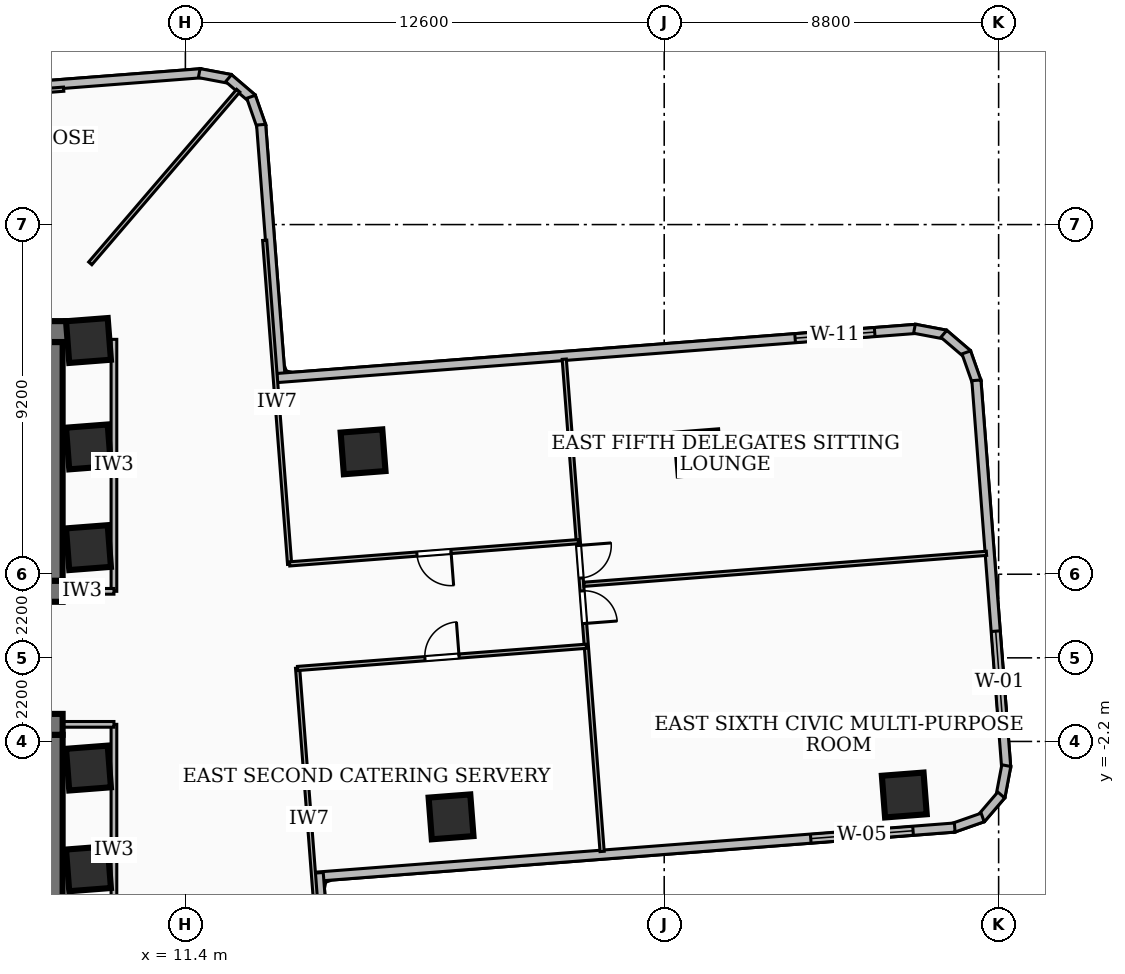
"""IFC4 building model, lengths in metres.
Left out: names, types, materials, properties, quantities, classifications, styles, units other than length and angle.
Written with IfcOpenShell. Run it as: python <this file> out.ifc"""

import sys

from ifc_helpers import new_model, si_unit, direction, frame, frame_2d, origin, origin_2d, place, context, subcontext, project, spatial, rectangle, extrude, element, fill, save


model = new_model("IFC4")
c1 = context("Model", 3, precision=1e-05, world=origin(), true_north=direction((0.0, 1.0)))
c2 = subcontext(c1, "Body", "Model", "MODEL_VIEW")
j1 = project(units=[si_unit("LENGTHUNIT", "METRE"), si_unit("PLANEANGLEUNIT", "RADIAN")], contexts=[c1])
p1 = place(None, origin())
s1 = spatial("IfcSite", under=j1, at=p1, CompositionType="ELEMENT")
p2 = place(p1, origin())
s2 = spatial("IfcBuilding", under=s1, at=p2, CompositionType="ELEMENT")
p3 = place(p2, frame((0.0, 0.0, 60.48)))
s3 = spatial("IfcBuildingStorey", under=s2, at=p3, CompositionType="ELEMENT", Elevation=60.48)
p4 = place(p3, frame((-8.78, 8.585, 0.0), z_axis=(0.0, 0.0, 1.0), x_axis=(1.0, 0.0, 0.0)))
e1 = element("IfcWall", 1, at=p4, inside=s3, PredefinedType="SHEAR", context=c2, shape_type="SweptSolid", body=[
    extrude(rectangle(XDim=17.56, YDim=0.55, at=frame_2d((8.78, 0.0))), origin(), (0.0, 0.0, 1.0), 3.32),
])
p5 = place(p3, frame((8.17, 1.75, 0.0), z_axis=(0.0, 0.0, 1.0), x_axis=(-1.0, 0.0, 0.0)))
e2 = element("IfcWall", 2, at=p5, inside=s3, PredefinedType="SHEAR", context=c2, shape_type="SweptSolid", body=[
    extrude(rectangle(XDim=16.34, YDim=0.55, at=frame_2d((8.17, 0.0))), origin(), (0.0, 0.0, 1.0), 3.32),
])
p6 = place(p5, frame((7.45, 0.0, 0.0)))
e3 = element("IfcOpeningElement", 3, at=p6, cuts=e2, PredefinedType="OPENING", context=c2, shape_type="SweptSolid", body=[
    extrude(rectangle(XDim=1.0, YDim=2.1, at=frame_2d((0.5, 1.05))), frame((0.0, 0.285, 0.0), z_axis=(0.0, -1.0, 0.0), x_axis=(1.0, 0.0, 0.0)), (0.0, 0.0, 1.0), 0.57),
])
p7 = place(p5, frame((3.4, 0.0, 0.0)))
e4 = element("IfcOpeningElement", 4, at=p7, cuts=e2, PredefinedType="OPENING", context=c2, shape_type="SweptSolid", body=[
    extrude(rectangle(XDim=0.9, YDim=2.06, at=frame_2d((0.45, 1.03))), frame((0.0, 0.285, 0.0), z_axis=(0.0, -1.0, 0.0), x_axis=(1.0, 0.0, 0.0)), (0.0, 0.0, 1.0), 0.57),
])
p8 = place(p5, frame((1.1, 0.0, 0.0)))
e5 = element("IfcOpeningElement", 5, at=p8, cuts=e2, PredefinedType="OPENING", context=c2, shape_type="SweptSolid", body=[
    extrude(rectangle(XDim=0.9, YDim=2.06, at=frame_2d((0.45, 1.03))), frame((0.0, 0.285, 0.0), z_axis=(0.0, -1.0, 0.0), x_axis=(1.0, 0.0, 0.0)), (0.0, 0.0, 1.0), 0.57),
])
p9 = place(p3, frame((7.895, 8.31, 0.0), z_axis=(0.0, 0.0, 1.0), x_axis=(0.0, -1.0, 0.0)))
e6 = element("IfcWall", 6, at=p9, inside=s3, PredefinedType="SHEAR", context=c2, shape_type="SweptSolid", body=[
    extrude(rectangle(XDim=6.285, YDim=0.55, at=frame_2d((3.143, 0.0))), origin(), (0.0, 0.0, 1.0), 3.32),
])
p10 = place(p3, frame((-8.17, -1.75, 0.0), z_axis=(0.0, 0.0, 1.0), x_axis=(1.0, 0.0, 0.0)))
e7 = element("IfcWall", 7, at=p10, inside=s3, PredefinedType="SHEAR", context=c2, shape_type="SweptSolid", body=[
    extrude(rectangle(XDim=16.34, YDim=0.55, at=frame_2d((8.17, 0.0))), origin(), (0.0, 0.0, 1.0), 3.32),
])
p11 = place(p10, frame((7.45, 0.0, 0.0)))
e8 = element("IfcOpeningElement", 8, at=p11, cuts=e7, PredefinedType="OPENING", context=c2, shape_type="SweptSolid", body=[
    extrude(rectangle(XDim=1.0, YDim=2.1, at=frame_2d((0.5, 1.05))), frame((0.0, 0.285, 0.0), z_axis=(0.0, -1.0, 0.0), x_axis=(1.0, 0.0, 0.0)), (0.0, 0.0, 1.0), 0.57),
])
p12 = place(p10, frame((10.965, 0.0, 0.0)))
e9 = element("IfcOpeningElement", 9, at=p12, cuts=e7, PredefinedType="OPENING", context=c2, shape_type="SweptSolid", body=[
    extrude(rectangle(XDim=1.05, YDim=2.15, at=frame_2d((0.525, 1.075))), frame((0.0, 0.285, 0.0), z_axis=(0.0, -1.0, 0.0), x_axis=(1.0, 0.0, 0.0)), (0.0, 0.0, 1.0), 0.57),
])
p13 = place(p10, frame((12.525, 0.0, 0.0)))
e10 = element("IfcOpeningElement", 10, at=p13, cuts=e7, PredefinedType="OPENING", context=c2, shape_type="SweptSolid", body=[
    extrude(rectangle(XDim=1.05, YDim=2.15, at=frame_2d((0.525, 1.075))), frame((0.0, 0.285, 0.0), z_axis=(0.0, -1.0, 0.0), x_axis=(1.0, 0.0, 0.0)), (0.0, 0.0, 1.0), 0.57),
])
p14 = place(p10, frame((14.085, 0.0, 0.0)))
e11 = element("IfcOpeningElement", 11, at=p14, cuts=e7, PredefinedType="OPENING", context=c2, shape_type="SweptSolid", body=[
    extrude(rectangle(XDim=1.05, YDim=2.15, at=frame_2d((0.525, 1.075))), frame((0.0, 0.285, 0.0), z_axis=(0.0, -1.0, 0.0), x_axis=(1.0, 0.0, 0.0)), (0.0, 0.0, 1.0), 0.57),
])
p15 = place(p3, frame((7.895, -2.025, 0.0), z_axis=(0.0, 0.0, 1.0), x_axis=(0.0, -1.0, 0.0)))
e12 = element("IfcWall", 12, at=p15, inside=s3, PredefinedType="SHEAR", context=c2, shape_type="SweptSolid", body=[
    extrude(rectangle(XDim=6.285, YDim=0.55, at=frame_2d((3.143, 0.0))), origin(), (0.0, 0.0, 1.0), 3.32),
])
for number, where, z_axis, x_axis in (
    (13, (8.85, -5.55, 0.0), (0.0, 0.0, 1.0), (0.997, 0.077, 0.0)),
    (14, (8.85, -2.9, 0.0), (0.0, 0.0, 1.0), (0.997, 0.077, 0.0)),
    (15, (8.85, 2.9, 0.0), (0.0, 0.0, 1.0), (0.997, 0.077, 0.0)),
    (16, (8.85, 5.55, 0.0), (0.0, 0.0, 1.0), (0.997, 0.077, 0.0)),
    (17, (8.85, 8.35, 0.0), (0.0, 0.0, 1.0), (0.997, 0.077, 0.0)),
    (18, (18.391, -4.184, 0.0), (0.0, 0.0, 1.0), (0.997, 0.077, 0.0)),
    (19, (16.076, 5.421, 0.0), (0.0, 0.0, 1.0), (0.997, 0.077, 0.0)),
    (20, (30.318, -3.609, 0.0), (0.0, 0.0, 1.0), (0.997, 0.077, 0.0)),
    (21, (24.888, 5.393, 0.0), (0.0, 0.0, 1.0), (0.997, 0.077, 0.0)),
):
    element("IfcColumn", number, at=place(p3, frame(where, z_axis=z_axis, x_axis=x_axis)), inside=s3, PredefinedType="COLUMN", context=c2, shape_type="SweptSolid", body=[
        extrude(rectangle(XDim=1.1, YDim=1.1, at=origin_2d()), origin(), (0.0, 0.0, 1.0), 3.6),
    ])
p16 = place(p3, frame((5.657, 14.908, 0.0), z_axis=(0.0, 0.0, 1.0), x_axis=(0.997048202977, 0.076778128006, 0.0)))
e22 = element("IfcWall", 22, at=p16, inside=s3, PredefinedType="SOLIDWALL", context=c2, shape_type="SweptSolid", body=[
    extrude(rectangle(XDim=6.175, YDim=0.24, at=frame_2d((3.088, 0.0))), origin(), (0.0, 0.0, 1.0), 2.401),
])
p17 = place(p3, frame((11.764, 15.385, 0.0), z_axis=(0.0, 0.0, 1.0), x_axis=(0.982688894005, -0.185263427582, 0.0)))
e23 = element("IfcWall", 23, at=p17, inside=s3, PredefinedType="SOLIDWALL", context=c2, shape_type="SweptSolid", body=[
    extrude(rectangle(XDim=0.832, YDim=0.24, at=frame_2d((0.416, 0.0))), origin(), (0.0, 0.0, 1.0), 3.32),
])
p18 = place(p3, frame((12.537, 15.252, 0.0), z_axis=(0.0, 0.0, 1.0), x_axis=(0.759616636226, -0.650371098657, 0.0)))
e24 = element("IfcWall", 24, at=p18, inside=s3, PredefinedType="SOLIDWALL", context=c2, shape_type="SweptSolid", body=[
    extrude(rectangle(XDim=0.813, YDim=0.24, at=frame_2d((0.407, 0.0))), origin(), (0.0, 0.0, 1.0), 3.32),
])
p19 = place(p3, frame((13.128, 14.763, 0.0), z_axis=(0.0, 0.0, 1.0), x_axis=(0.331174926, -0.943569376564, 0.0)))
e25 = element("IfcWall", 25, at=p19, inside=s3, PredefinedType="SOLIDWALL", context=c2, shape_type="SweptSolid", body=[
    extrude(rectangle(XDim=0.831, YDim=0.24, at=frame_2d((0.416, 0.0))), origin(), (0.0, 0.0, 1.0), 3.32),
])
p20 = place(p3, frame((13.393, 14.028, 0.0), z_axis=(0.0, 0.0, 1.0), x_axis=(0.076754366588, -0.997050032451, 0.0)))
e26 = element("IfcWall", 26, at=p20, inside=s3, PredefinedType="SOLIDWALL", context=c2, shape_type="SweptSolid", body=[
    extrude(rectangle(XDim=6.775, YDim=0.24, at=frame_2d((3.388, 0.0))), origin(), (0.0, 0.0, 1.0), 3.32),
])
p21 = place(p3, frame((13.81, 7.362, 0.0), z_axis=(0.0, 0.0, 1.0), x_axis=(0.997055761943, 0.076679903335, 0.0)))
e27 = element("IfcWall", 27, at=p21, inside=s3, PredefinedType="SOLIDWALL", context=c2, shape_type="SweptSolid", body=[
    extrude(rectangle(XDim=16.875, YDim=0.24, at=frame_2d((8.438, 0.0))), origin(), (0.0, 0.0, 1.0), 3.32),
])
p22 = place(p21, frame((13.675, 0.0, 0.85)))
e28 = element("IfcOpeningElement", 28, at=p22, cuts=e27, PredefinedType="OPENING", context=c2, shape_type="SweptSolid", body=[
    extrude(rectangle(XDim=2.1, YDim=1.6, at=frame_2d((1.05, 0.8))), frame((0.0, 0.13, 0.0), z_axis=(0.0, -1.0, 0.0), x_axis=(1.0, 0.0, 0.0)), (0.0, 0.0, 1.0), 0.26),
])
p23 = place(p3, frame((30.585, 8.659, 0.0), z_axis=(0.0, 0.0, 1.0), x_axis=(0.982688894005, -0.185263427582, 0.0)))
e29 = element("IfcWall", 29, at=p23, inside=s3, PredefinedType="SOLIDWALL", context=c2, shape_type="SweptSolid", body=[
    extrude(rectangle(XDim=0.832, YDim=0.24, at=frame_2d((0.416, 0.0))), origin(), (0.0, 0.0, 1.0), 3.32),
])
p24 = place(p3, frame((31.358, 8.526, 0.0), z_axis=(0.0, 0.0, 1.0), x_axis=(0.759891778471, -0.650049601962, 0.0)))
e30 = element("IfcWall", 30, at=p24, inside=s3, PredefinedType="SOLIDWALL", context=c2, shape_type="SweptSolid", body=[
    extrude(rectangle(XDim=0.813, YDim=0.24, at=frame_2d((0.407, 0.0))), origin(), (0.0, 0.0, 1.0), 3.32),
])
p25 = place(p3, frame((31.949, 8.037, 0.0), z_axis=(0.0, 0.0, 1.0), x_axis=(0.332128799234, -0.943234043448, 0.0)))
e31 = element("IfcWall", 31, at=p25, inside=s3, PredefinedType="SOLIDWALL", context=c2, shape_type="SweptSolid", body=[
    extrude(rectangle(XDim=0.831, YDim=0.24, at=frame_2d((0.416, 0.0))), origin(), (0.0, 0.0, 1.0), 3.32),
])
p26 = place(p3, frame((32.215, 7.302, 0.0), z_axis=(0.0, 0.0, 1.0), x_axis=(0.076720251263, -0.997052658111, 0.0)))
e32 = element("IfcWall", 32, at=p26, inside=s3, PredefinedType="SOLIDWALL", context=c2, shape_type="SweptSolid", body=[
    extrude(rectangle(XDim=10.218, YDim=0.24, at=frame_2d((5.109, 0.0))), origin(), (0.0, 0.0, 1.0), 3.32),
])
p27 = place(p26, frame((6.62, 0.0, 0.85)))
e33 = element("IfcOpeningElement", 33, at=p27, cuts=e32, PredefinedType="OPENING", context=c2, shape_type="SweptSolid", body=[
    extrude(rectangle(XDim=2.7, YDim=2.1, at=frame_2d((1.35, 1.05))), frame((0.0, 0.13, 0.0), z_axis=(0.0, -1.0, 0.0), x_axis=(1.0, 0.0, 0.0)), (0.0, 0.0, 1.0), 0.26),
])
p28 = place(p3, frame((33.002, -2.836, 0.0), z_axis=(0.0, 0.0, 1.0), x_axis=(-0.185263427582, -0.982688894005, 0.0)))
e34 = element("IfcWall", 34, at=p28, inside=s3, PredefinedType="SOLIDWALL", context=c2, shape_type="SweptSolid", body=[
    extrude(rectangle(XDim=0.832, YDim=0.24, at=frame_2d((0.416, 0.0))), origin(), (0.0, 0.0, 1.0), 3.32),
])
p29 = place(p3, frame((32.869, -3.609, 0.0), z_axis=(0.0, 0.0, 1.0), x_axis=(-0.650049601962, -0.759891778471, 0.0)))
e35 = element("IfcWall", 35, at=p29, inside=s3, PredefinedType="SOLIDWALL", context=c2, shape_type="SweptSolid", body=[
    extrude(rectangle(XDim=0.813, YDim=0.24, at=frame_2d((0.407, 0.0))), origin(), (0.0, 0.0, 1.0), 3.32),
])
p30 = place(p3, frame((32.38, -4.2, 0.0), z_axis=(0.0, 0.0, 1.0), x_axis=(-0.943569376564, -0.331174926, 0.0)))
e36 = element("IfcWall", 36, at=p30, inside=s3, PredefinedType="SOLIDWALL", context=c2, shape_type="SweptSolid", body=[
    extrude(rectangle(XDim=0.831, YDim=0.24, at=frame_2d((0.416, 0.0))), origin(), (0.0, 0.0, 1.0), 3.32),
])
p31 = place(p3, frame((31.645, -4.465, 0.0), z_axis=(0.0, 0.0, 1.0), x_axis=(-0.997051676532, -0.076733006752, 0.0)))
e37 = element("IfcWall", 37, at=p31, inside=s3, PredefinedType="SOLIDWALL", context=c2, shape_type="SweptSolid", body=[
    extrude(rectangle(XDim=16.876, YDim=0.24, at=frame_2d((8.438, 0.0))), origin(), (0.0, 0.0, 1.0), 3.32),
])
p32 = place(p31, frame((1.1, 0.0, 0.85)))
e38 = element("IfcOpeningElement", 38, at=p32, cuts=e37, PredefinedType="OPENING", context=c2, shape_type="SweptSolid", body=[
    extrude(rectangle(XDim=2.7, YDim=1.85, at=frame_2d((1.35, 0.925))), frame((0.0, 0.13, 0.0), z_axis=(0.0, -1.0, 0.0), x_axis=(1.0, 0.0, 0.0)), (0.0, 0.0, 1.0), 0.26),
])
p33 = place(p3, frame((14.908, -5.657, 0.0), z_axis=(0.0, 0.0, 1.0), x_axis=(0.076778128006, -0.997048202977, 0.0)))
e39 = element("IfcWall", 39, at=p33, inside=s3, PredefinedType="SOLIDWALL", context=c2, shape_type="SweptSolid", body=[
    extrude(rectangle(XDim=6.175, YDim=0.24, at=frame_2d((3.088, 0.0))), origin(), (0.0, 0.0, 1.0), 3.32),
])
p34 = place(p3, frame((9.52, 1.75, 0.0), z_axis=(0.0, 0.0, 1.0), x_axis=(0.0, 1.0, 0.0)))
e40 = element("IfcWall", 40, at=p34, inside=s3, PredefinedType="PARTITIONING", context=c2, shape_type="SweptSolid", body=[
    extrude(rectangle(XDim=6.63, YDim=0.15, at=frame_2d((3.315, 0.0))), origin(), (0.0, 0.0, 1.0), 2.401),
])
p35 = place(p3, frame((7.85, 1.75, 0.0), z_axis=(0.0, 0.0, 1.0), x_axis=(1.0, 0.0, 0.0)))
e41 = element("IfcWall", 41, at=p35, inside=s3, PredefinedType="PARTITIONING", context=c2, shape_type="SweptSolid", body=[
    extrude(rectangle(XDim=1.67, YDim=0.15, at=frame_2d((0.835, 0.0))), origin(), (0.0, 0.0, 1.0), 2.385),
])
p36 = place(p3, frame((9.52, -8.38, 0.0), z_axis=(0.0, 0.0, 1.0), x_axis=(0.0, 1.0, 0.0)))
e42 = element("IfcWall", 42, at=p36, inside=s3, PredefinedType="PARTITIONING", context=c2, shape_type="SweptSolid", body=[
    extrude(rectangle(XDim=6.63, YDim=0.15, at=frame_2d((3.315, 0.0))), origin(), (0.0, 0.0, 1.0), 2.401),
])
p37 = place(p3, frame((7.85, -1.75, 0.0), z_axis=(0.0, 0.0, 1.0), x_axis=(1.0, 0.0, 0.0)))
e43 = element("IfcWall", 43, at=p37, inside=s3, PredefinedType="PARTITIONING", context=c2, shape_type="SweptSolid", body=[
    extrude(rectangle(XDim=1.67, YDim=0.15, at=frame_2d((0.835, 0.0))), origin(), (0.0, 0.0, 1.0), 2.385),
])
p38 = place(p3, frame((8.897, 10.38, 0.0), z_axis=(0.0, 0.0, 1.0), x_axis=(0.650777932984, 0.759268122564, 0.0)))
e44 = element("IfcWall", 44, at=p38, inside=s3, PredefinedType="PARTITIONING", context=c2, shape_type="SweptSolid", body=[
    extrude(rectangle(XDim=5.984, YDim=0.11, at=frame_2d((2.992, 0.0))), origin(), (0.0, 0.0, 1.0), 3.32),
])
p39 = place(p3, frame((14.143, 2.462, 0.0), z_axis=(0.0, 0.0, 1.0), x_axis=(-0.076722700704, 0.997052469631, 0.0)))
e45 = element("IfcWall", 45, at=p39, inside=s3, PredefinedType="PARTITIONING", context=c2, shape_type="SweptSolid", body=[
    extrude(rectangle(XDim=8.55, YDim=0.11, at=frame_2d((4.275, 0.0))), origin(), (0.0, 0.0, 1.0), 2.401),
])
p40 = place(p3, frame((14.963, -8.197, 0.0), z_axis=(0.0, 0.0, 1.0), x_axis=(-0.076708240121, 0.99705358226, 0.0)))
e46 = element("IfcWall", 46, at=p40, inside=s3, PredefinedType="PARTITIONING", context=c2, shape_type="SweptSolid", body=[
    extrude(rectangle(XDim=7.95, YDim=0.11, at=frame_2d((3.975, 0.0))), origin(), (0.0, 0.0, 1.0), 2.401),
])
p41 = place(p3, frame((21.74, 3.057, 0.0), z_axis=(0.0, 0.0, 1.0), x_axis=(-0.997049394946, -0.076762647418, 0.0)))
e47 = element("IfcWall", 47, at=p41, inside=s3, PredefinedType="PARTITIONING", context=c2, shape_type="SweptSolid", body=[
    extrude(rectangle(XDim=7.62, YDim=0.11, at=frame_2d((3.81, 0.0))), origin(), (0.0, 0.0, 1.0), 3.32),
])
p42 = place(p41, frame((3.36, 0.0, 0.0)))
e48 = element("IfcOpeningElement", 48, at=p42, cuts=e47, PredefinedType="OPENING", context=c2, shape_type="SweptSolid", body=[
    extrude(rectangle(XDim=0.9, YDim=2.06, at=frame_2d((0.45, 1.03))), frame((0.0, 0.065, 0.0), z_axis=(0.0, -1.0, 0.0), x_axis=(1.0, 0.0, 0.0)), (0.0, 0.0, 1.0), 0.13),
])
p43 = place(p3, frame((14.354, -0.28, 0.0), z_axis=(0.0, 0.0, 1.0), x_axis=(0.997048639669, 0.076772456877, 0.0)))
e49 = element("IfcWall", 49, at=p43, inside=s3, PredefinedType="PARTITIONING", context=c2, shape_type="SweptSolid", body=[
    extrude(rectangle(XDim=7.619, YDim=0.11, at=frame_2d((3.81, 0.0))), origin(), (0.0, 0.0, 1.0), 3.32),
])
p44 = place(p43, frame((3.36, 0.0, 0.0)))
e50 = element("IfcOpeningElement", 50, at=p44, cuts=e49, PredefinedType="OPENING", context=c2, shape_type="SweptSolid", body=[
    extrude(rectangle(XDim=0.9, YDim=2.06, at=frame_2d((0.45, 1.03))), frame((0.0, 0.065, 0.0), z_axis=(0.0, -1.0, 0.0), x_axis=(1.0, 0.0, 0.0)), (0.0, 0.0, 1.0), 0.13),
])
p45 = place(p3, frame((21.886, 1.935, 0.0), z_axis=(0.0, 0.0, 1.0), x_axis=(0.997054350339, 0.076698255973, 0.0)))
e51 = element("IfcWall", 51, at=p45, inside=s3, PredefinedType="PARTITIONING", context=c2, shape_type="SweptSolid", body=[
    extrude(rectangle(XDim=10.625, YDim=0.11, at=frame_2d((5.312, 0.0))), origin(), (0.0, 0.0, 1.0), 2.812),
])
p46 = place(p3, frame((21.37, 7.858, 0.0), z_axis=(0.0, 0.0, 1.0), x_axis=(0.076662005745, -0.99705713822, 0.0)))
e52 = element("IfcWall", 52, at=p46, inside=s3, PredefinedType="PARTITIONING", context=c2, shape_type="SweptSolid", body=[
    extrude(rectangle(XDim=12.99, YDim=0.11, at=frame_2d((6.495, 0.0))), origin(), (0.0, 0.0, 1.0), 2.401),
])
p47 = place(p46, frame((6.115, 0.0, 0.0)))
e53 = element("IfcOpeningElement", 53, at=p47, cuts=e52, PredefinedType="OPENING", context=c2, shape_type="SweptSolid", body=[
    extrude(rectangle(XDim=0.86, YDim=2.04, at=frame_2d((0.43, 1.02))), frame((0.0, 0.065, 0.0), z_axis=(0.0, -1.0, 0.0), x_axis=(1.0, 0.0, 0.0)), (0.0, 0.0, 1.0), 0.13),
])
p48 = place(p46, frame((4.915, 0.0, 0.0)))
e54 = element("IfcOpeningElement", 54, at=p48, cuts=e52, PredefinedType="OPENING", context=c2, shape_type="SweptSolid", body=[
    extrude(rectangle(XDim=0.86, YDim=2.04, at=frame_2d((0.43, 1.02))), frame((0.0, 0.065, 0.0), z_axis=(0.0, -1.0, 0.0), x_axis=(1.0, 0.0, 0.0)), (0.0, 0.0, 1.0), 0.13),
])
p49 = place(p3, frame((8.197, 14.963, 0.0), z_axis=(0.0, 0.0, 1.0), x_axis=(-0.99705358226, -0.076708240121, 0.0)))
e55 = element("IfcWall", 55, at=p49, inside=s3, PredefinedType="PARTITIONING", context=c2, shape_type="SweptSolid", body=[
    extrude(rectangle(XDim=7.95, YDim=0.11, at=frame_2d((3.975, 0.0))), origin(), (0.0, 0.0, 1.0), 2.401),
])
p50 = place(p22, origin())
e56 = element("IfcWindow", 56, at=p50, inside=s3, PartitioningType="SINGLE_PANEL", PredefinedType="WINDOW", context=c2, shape_type="SweptSolid", body=[
    extrude(rectangle(XDim=2.1, YDim=1.6, at=frame_2d((1.05, 0.8))), frame((0.0, 0.03, 0.0), z_axis=(0.0, -1.0, 0.0), x_axis=(1.0, 0.0, 0.0)), (0.0, 0.0, 1.0), 0.06),
])
fill(e28, e56)
p51 = place(p27, origin())
e57 = element("IfcWindow", 57, at=p51, inside=s3, PartitioningType="SINGLE_PANEL", PredefinedType="WINDOW", context=c2, shape_type="SweptSolid", body=[
    extrude(rectangle(XDim=2.7, YDim=2.1, at=frame_2d((1.35, 1.05))), frame((0.0, 0.03, 0.0), z_axis=(0.0, -1.0, 0.0), x_axis=(1.0, 0.0, 0.0)), (0.0, 0.0, 1.0), 0.06),
])
fill(e33, e57)
p52 = place(p32, origin())
e58 = element("IfcWindow", 58, at=p52, inside=s3, PartitioningType="SINGLE_PANEL", PredefinedType="WINDOW", context=c2, shape_type="SweptSolid", body=[
    extrude(rectangle(XDim=2.7, YDim=1.85, at=frame_2d((1.35, 0.925))), frame((0.0, 0.03, 0.0), z_axis=(0.0, -1.0, 0.0), x_axis=(1.0, 0.0, 0.0)), (0.0, 0.0, 1.0), 0.06),
])
fill(e38, e58)
p53 = place(p42, origin())
e59 = element("IfcDoor", 59, at=p53, inside=s3, OperationType="SINGLE_SWING_LEFT", PredefinedType="DOOR", context=c2, shape_type="SweptSolid", body=[
    extrude(rectangle(XDim=0.9, YDim=2.06, at=frame_2d((0.45, 1.03))), frame((0.0, 0.025, 0.0), z_axis=(0.0, -1.0, 0.0), x_axis=(1.0, 0.0, 0.0)), (0.0, 0.0, 1.0), 0.05),
])
fill(e48, e59)
p54 = place(p44, origin())
e60 = element("IfcDoor", 60, at=p54, inside=s3, OperationType="SINGLE_SWING_RIGHT", PredefinedType="DOOR", context=c2, shape_type="SweptSolid", body=[
    extrude(rectangle(XDim=0.9, YDim=2.06, at=frame_2d((0.45, 1.03))), frame((0.0, 0.025, 0.0), z_axis=(0.0, -1.0, 0.0), x_axis=(1.0, 0.0, 0.0)), (0.0, 0.0, 1.0), 0.05),
])
fill(e50, e60)
p55 = place(p47, origin())
e61 = element("IfcDoor", 61, at=p55, inside=s3, OperationType="SINGLE_SWING_RIGHT", PredefinedType="DOOR", context=c2, shape_type="SweptSolid", body=[
    extrude(rectangle(XDim=0.86, YDim=2.04, at=frame_2d((0.43, 1.02))), frame((0.0, 0.025, 0.0), z_axis=(0.0, -1.0, 0.0), x_axis=(1.0, 0.0, 0.0)), (0.0, 0.0, 1.0), 0.05),
])
fill(e53, e61)
p56 = place(p48, origin())
e62 = element("IfcDoor", 62, at=p56, inside=s3, OperationType="SINGLE_SWING_LEFT", PredefinedType="DOOR", context=c2, shape_type="SweptSolid", body=[
    extrude(rectangle(XDim=0.86, YDim=2.04, at=frame_2d((0.43, 1.02))), frame((0.0, 0.025, 0.0), z_axis=(0.0, -1.0, 0.0), x_axis=(1.0, 0.0, 0.0)), (0.0, 0.0, 1.0), 0.05),
])
fill(e54, e62)
save(model, sys.argv[1])
